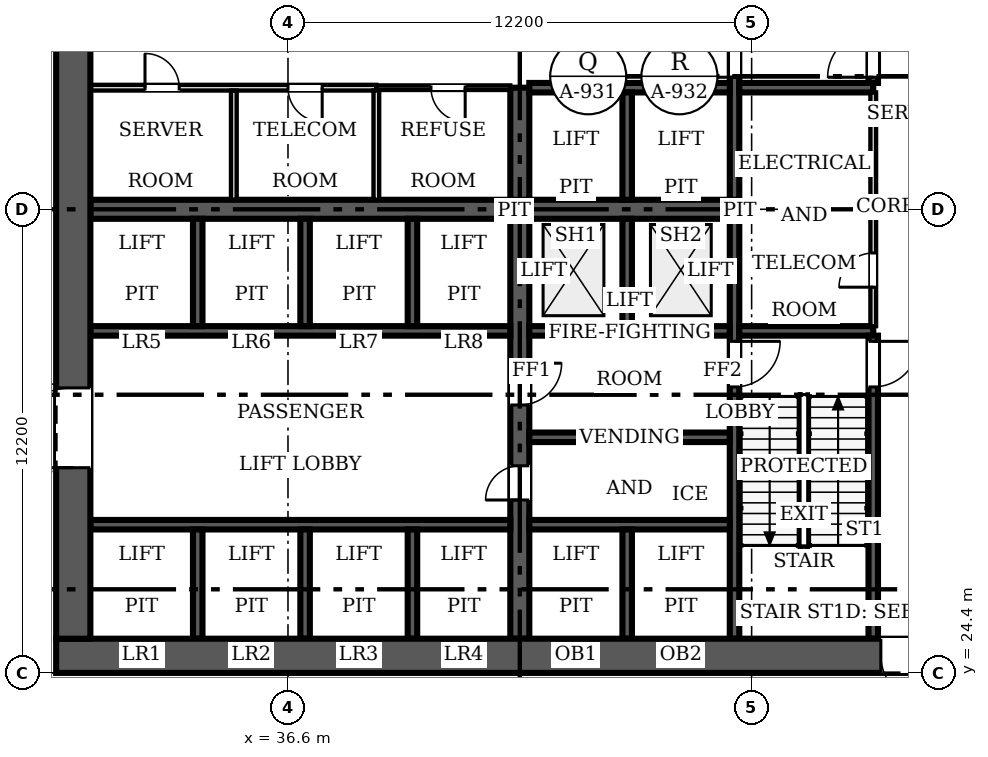
"""IFC4 building model, lengths in metres.
Left out: names, types, materials, properties, quantities, classifications, styles, units other than length and angle.
Written with IfcOpenShell. Run it as: python <this file> out.ifc"""

import sys

from ifc_helpers import new_model, si_unit, direction, frame, frame_2d, origin, place, context, subcontext, project, spatial, rectangle, extrude, source, transform, mapped, element, fill, save


model = new_model("IFC4")
c1 = context("Model", 3, precision=1e-05, world=origin(), true_north=direction((0.0, 1.0)))
c2 = subcontext(c1, "Body", "Model", "MODEL_VIEW")
j1 = project(units=[si_unit("LENGTHUNIT", "METRE"), si_unit("PLANEANGLEUNIT", "RADIAN")], contexts=[c1])
p1 = place(None, origin())
s1 = spatial("IfcSite", under=j1, at=p1, CompositionType="ELEMENT")
p2 = place(p1, origin())
s2 = spatial("IfcBuilding", under=s1, at=p2, CompositionType="ELEMENT")
p3 = place(p2, frame((0.0, 0.0, -5.4)))
s3 = spatial("IfcBuildingStorey", under=s2, at=p3, CompositionType="ELEMENT", Elevation=-5.4)
p4 = place(p3, frame((54.9, 24.85, 0.0), z_axis=(0.0, 0.0, 1.0), x_axis=(-1.0, 0.0, 0.0)))
e1 = element("IfcWall", 1, at=p4, inside=s3, PredefinedType="SHEAR", context=c2, shape_type="SweptSolid", body=[
    extrude(rectangle(XDim=24.4, YDim=0.9, at=frame_2d((12.2, 0.0))), origin(), (0.0, 0.0, 1.0), 5.4),
])
m1 = source(origin(), c2, "Body", "SweptSolid", [
    extrude(rectangle(XDim=1.2, YDim=2.1, at=frame_2d((0.6, 1.05))), frame((0.0, 0.46, 0.0), z_axis=(0.0, -1.0, 0.0), x_axis=(1.0, 0.0, 0.0)), (0.0, 0.0, 1.0), 0.92),
])
p5 = place(p4, frame((1.5, 0.0, 0.0)))
e2 = element("IfcOpeningElement", 2, at=p5, cuts=e1, PredefinedType="OPENING", context=c2, shape_type="MappedRepresentation", body=[
    mapped(m1, transform((0.0, 0.0, 0.0), scale=1.0)),
])
p6 = place(p3, frame((30.95, 25.3, 0.0), z_axis=(0.0, 0.0, 1.0), x_axis=(0.0, 1.0, 0.0)))
e3 = element("IfcWall", 3, at=p6, inside=s3, PredefinedType="SHEAR", context=c2, shape_type="SweptSolid", body=[
    extrude(rectangle(XDim=22.6, YDim=0.9, at=frame_2d((11.3, 0.0))), origin(), (0.0, 0.0, 1.0), 5.4),
])
m2 = source(origin(), c2, "Body", "SweptSolid", [
    extrude(rectangle(XDim=2.1, YDim=2.4, at=frame_2d((1.05, 1.2))), frame((0.0, 0.46, 0.0), z_axis=(0.0, -1.0, 0.0), x_axis=(1.0, 0.0, 0.0)), (0.0, 0.0, 1.0), 0.92),
])
p7 = place(p6, frame((4.5, 0.0, 0.0)))
e4 = element("IfcOpeningElement", 4, at=p7, cuts=e3, PredefinedType="OPENING", context=c2, shape_type="MappedRepresentation", body=[
    mapped(m2, transform((0.0, 0.0, 0.0), scale=1.0)),
])
p8 = place(p6, frame((16.0, 0.0, 0.0)))
e5 = element("IfcOpeningElement", 5, at=p8, cuts=e3, PredefinedType="OPENING", context=c2, shape_type="MappedRepresentation", body=[
    mapped(m2, transform((0.0, 0.0, 0.0), scale=1.0)),
])
p9 = place(p3, frame((31.4, 36.6, 0.0), z_axis=(0.0, 0.0, 1.0), x_axis=(1.0, 0.0, 0.0)))
e6 = element("IfcWall", 6, at=p9, inside=s3, PredefinedType="SHEAR", context=c2, shape_type="SweptSolid", body=[
    extrude(rectangle(XDim=16.95, YDim=0.5, at=frame_2d((8.475, 0.0))), origin(), (0.0, 0.0, 1.0), 5.4),
])
p10 = place(p3, frame((42.7, 36.35, 0.0), z_axis=(0.0, 0.0, 1.0), x_axis=(0.0, -1.0, 0.0)))
e7 = element("IfcWall", 7, at=p10, inside=s3, PredefinedType="SHEAR", context=c2, shape_type="SweptSolid", body=[
    extrude(rectangle(XDim=11.05, YDim=0.5, at=frame_2d((5.525, 0.0))), origin(), (0.0, 0.0, 1.0), 5.4),
])
m3 = source(origin(), c2, "Body", "SweptSolid", [
    extrude(rectangle(XDim=0.9, YDim=2.1, at=frame_2d((0.45, 1.05))), frame((0.0, 0.26, 0.0), z_axis=(0.0, -1.0, 0.0), x_axis=(1.0, 0.0, 0.0)), (0.0, 0.0, 1.0), 0.52),
])
p11 = place(p10, frame((6.5, 0.0, 0.0)))
e8 = element("IfcOpeningElement", 8, at=p11, cuts=e7, PredefinedType="OPENING", context=c2, shape_type="MappedRepresentation", body=[
    mapped(m3, transform((0.0, 0.0, 0.0), scale=1.0)),
])
m4 = source(origin(), c2, "Body", "SweptSolid", [
    extrude(rectangle(XDim=1.1, YDim=2.1, at=frame_2d((0.55, 1.05))), frame((0.0, 0.26, 0.0), z_axis=(0.0, -1.0, 0.0), x_axis=(1.0, 0.0, 0.0)), (0.0, 0.0, 1.0), 0.52),
])
p12 = place(p10, frame((3.8, 0.0, 0.0)))
e9 = element("IfcOpeningElement", 9, at=p12, cuts=e7, PredefinedType="OPENING", context=c2, shape_type="MappedRepresentation", body=[
    mapped(m4, transform((0.0, 0.0, 0.0), scale=1.0)),
])
p13 = place(p3, frame((42.7, 36.85, 0.0), z_axis=(0.0, 0.0, 1.0), x_axis=(0.0, 1.0, 0.0)))
e10 = element("IfcWall", 10, at=p13, inside=s3, PredefinedType="SHEAR", context=c2, shape_type="SweptSolid", body=[
    extrude(rectangle(XDim=2.95, YDim=0.5, at=frame_2d((1.475, 0.0))), origin(), (0.0, 0.0, 1.0), 5.4),
])
p14 = place(p3, frame((48.35, 36.35, 0.0), z_axis=(0.0, 0.0, 1.0), x_axis=(0.0, -1.0, 0.0)))
e11 = element("IfcWall", 11, at=p14, inside=s3, PredefinedType="SOLIDWALL", context=c2, shape_type="SweptSolid", body=[
    extrude(rectangle(XDim=11.05, YDim=0.25, at=frame_2d((5.525, 0.0))), origin(), (0.0, 0.0, 1.0), 5.4),
])
m5 = source(origin(), c2, "Body", "SweptSolid", [
    extrude(rectangle(XDim=1.2, YDim=2.1, at=frame_2d((0.6, 1.05))), frame((0.0, 0.135, 0.0), z_axis=(0.0, -1.0, 0.0), x_axis=(1.0, 0.0, 0.0)), (0.0, 0.0, 1.0), 0.27),
])
p15 = place(p14, frame((3.225, 0.0, 0.0)))
e12 = element("IfcOpeningElement", 12, at=p15, cuts=e11, PredefinedType="OPENING", context=c2, shape_type="MappedRepresentation", body=[
    mapped(m5, transform((0.0, 0.0, 0.0), scale=1.0)),
])
p16 = place(p3, frame((48.35, 47.9, 0.0), z_axis=(0.0, 0.0, 1.0), x_axis=(0.0, -1.0, 0.0)))
e13 = element("IfcWall", 13, at=p16, inside=s3, PredefinedType="SOLIDWALL", context=c2, shape_type="SweptSolid", body=[
    extrude(rectangle(XDim=11.05, YDim=0.25, at=frame_2d((5.525, 0.0))), origin(), (0.0, 0.0, 1.0), 5.4),
])
p17 = place(p16, frame((6.625, 0.0, 0.0)))
e14 = element("IfcOpeningElement", 14, at=p17, cuts=e13, PredefinedType="OPENING", context=c2, shape_type="MappedRepresentation", body=[
    mapped(m5, transform((0.0, 0.0, 0.0), scale=1.0)),
])
p18 = place(p3, frame((31.4, 33.4, 0.0), z_axis=(0.0, 0.0, 1.0), x_axis=(1.0, 0.0, 0.0)))
e15 = element("IfcWall", 15, at=p18, inside=s3, PredefinedType="SOLIDWALL", context=c2, shape_type="SweptSolid", body=[
    extrude(rectangle(XDim=11.05, YDim=0.25, at=frame_2d((5.525, 0.0))), origin(), (0.0, 0.0, 1.0), 5.4),
])
p19 = place(p3, frame((48.225, 33.4, 0.0), z_axis=(0.0, 0.0, 1.0), x_axis=(-1.0, 0.0, 0.0)))
e16 = element("IfcWall", 16, at=p19, inside=s3, PredefinedType="SOLIDWALL", context=c2, shape_type="SweptSolid", body=[
    extrude(rectangle(XDim=5.275, YDim=0.25, at=frame_2d((2.638, 0.0))), origin(), (0.0, 0.0, 1.0), 5.4),
])
p20 = place(p19, frame((3.512, 0.0, 0.0)))
e17 = element("IfcOpeningElement", 17, at=p20, cuts=e16, PredefinedType="OPENING", context=c2, shape_type="MappedRepresentation", body=[
    mapped(m5, transform((0.0, 0.0, 0.0), scale=1.0)),
])
p21 = place(p19, frame((0.688, 0.0, 0.0)))
e18 = element("IfcOpeningElement", 18, at=p21, cuts=e16, PredefinedType="OPENING", context=c2, shape_type="MappedRepresentation", body=[
    mapped(m5, transform((0.0, 0.0, 0.0), scale=1.0)),
])
p22 = place(p3, frame((48.475, 33.4, 0.0), z_axis=(0.0, 0.0, 1.0), x_axis=(1.0, 0.0, 0.0)))
e19 = element("IfcWall", 19, at=p22, inside=s3, PredefinedType="SOLIDWALL", context=c2, shape_type="SweptSolid", body=[
    extrude(rectangle(XDim=3.525, YDim=0.25, at=frame_2d((1.762, 0.0))), origin(), (0.0, 0.0, 1.0), 5.4),
])
p23 = place(p3, frame((31.4, 28.3, 0.0), z_axis=(0.0, 0.0, 1.0), x_axis=(1.0, 0.0, 0.0)))
e20 = element("IfcWall", 20, at=p23, inside=s3, PredefinedType="SOLIDWALL", context=c2, shape_type="SweptSolid", body=[
    extrude(rectangle(XDim=11.05, YDim=0.25, at=frame_2d((5.525, 0.0))), origin(), (0.0, 0.0, 1.0), 5.4),
])
for number, where, z_axis, x_axis in (
    (21, (42.95, 28.3, 0.0), (0.0, 0.0, 1.0), (1.0, 0.0, 0.0)),
    (22, (42.95, 39.8, 0.0), (0.0, 0.0, 1.0), (1.0, 0.0, 0.0)),
):
    element("IfcWall", number, at=place(p3, frame(where, z_axis=z_axis, x_axis=x_axis)), inside=s3, PredefinedType="SOLIDWALL", context=c2, shape_type="SweptSolid", body=[
        extrude(rectangle(XDim=5.275, YDim=0.25, at=frame_2d((2.638, 0.0))), origin(), (0.0, 0.0, 1.0), 5.4),
    ])
p24 = place(p3, frame((48.475, 39.8, 0.0), z_axis=(0.0, 0.0, 1.0), x_axis=(1.0, 0.0, 0.0)))
e23 = element("IfcWall", 23, at=p24, inside=s3, PredefinedType="SOLIDWALL", context=c2, shape_type="SweptSolid", body=[
    extrude(rectangle(XDim=3.525, YDim=0.25, at=frame_2d((1.762, 0.0))), origin(), (0.0, 0.0, 1.0), 5.4),
])
p25 = place(p3, frame((52.0, 25.3, 0.0), z_axis=(0.0, 0.0, 1.0), x_axis=(0.0, 1.0, 0.0)))
e24 = element("IfcWall", 24, at=p25, inside=s3, PredefinedType="SOLIDWALL", context=c2, shape_type="SweptSolid", body=[
    extrude(rectangle(XDim=7.975, YDim=0.25, at=frame_2d((3.987, 0.0))), origin(), (0.0, 0.0, 1.0), 5.4),
])
p26 = place(p25, frame((6.625, 0.0, 0.0)))
e25 = element("IfcOpeningElement", 25, at=p26, cuts=e24, PredefinedType="OPENING", context=c2, shape_type="MappedRepresentation", body=[
    mapped(m5, transform((0.0, 0.0, 0.0), scale=1.0)),
])
p27 = place(p3, frame((52.0, 39.925, 0.0), z_axis=(0.0, 0.0, 1.0), x_axis=(0.0, 1.0, 0.0)))
e26 = element("IfcWall", 26, at=p27, inside=s3, PredefinedType="SOLIDWALL", context=c2, shape_type="SweptSolid", body=[
    extrude(rectangle(XDim=7.975, YDim=0.25, at=frame_2d((3.987, 0.0))), origin(), (0.0, 0.0, 1.0), 5.4),
])
p28 = place(p27, frame((0.15, 0.0, 0.0)))
e27 = element("IfcOpeningElement", 27, at=p28, cuts=e26, PredefinedType="OPENING", context=c2, shape_type="MappedRepresentation", body=[
    mapped(m5, transform((0.0, 0.0, 0.0), scale=1.0)),
])
p29 = place(p3, frame((45.525, 33.525, 0.0), z_axis=(0.0, 0.0, 1.0), x_axis=(0.0, 1.0, 0.0)))
e28 = element("IfcWall", 28, at=p29, inside=s3, PredefinedType="SOLIDWALL", context=c2, shape_type="SweptSolid", body=[
    extrude(rectangle(XDim=2.825, YDim=0.25, at=frame_2d((1.413, 0.0))), origin(), (0.0, 0.0, 1.0), 5.4),
])
p30 = place(p3, frame((45.525, 36.85, 0.0), z_axis=(0.0, 0.0, 1.0), x_axis=(0.0, 1.0, 0.0)))
e29 = element("IfcWall", 29, at=p30, inside=s3, PredefinedType="SOLIDWALL", context=c2, shape_type="SweptSolid", body=[
    extrude(rectangle(XDim=2.825, YDim=0.25, at=frame_2d((1.413, 0.0))), origin(), (0.0, 0.0, 1.0), 5.4),
])
p31 = place(p3, frame((42.95, 30.6, 0.0), z_axis=(0.0, 0.0, 1.0), x_axis=(1.0, 0.0, 0.0)))
e30 = element("IfcWall", 30, at=p31, inside=s3, PredefinedType="SOLIDWALL", context=c2, shape_type="SweptSolid", body=[
    extrude(rectangle(XDim=5.275, YDim=0.25, at=frame_2d((2.638, 0.0))), origin(), (0.0, 0.0, 1.0), 5.4),
])
for number, where, z_axis, x_axis in (
    (31, (34.225, 33.525, 0.0), (0.0, 0.0, 1.0), (0.0, 1.0, 0.0)),
    (32, (37.05, 33.525, 0.0), (0.0, 0.0, 1.0), (0.0, 1.0, 0.0)),
    (33, (39.875, 33.525, 0.0), (0.0, 0.0, 1.0), (0.0, 1.0, 0.0)),
):
    element("IfcWall", number, at=place(p3, frame(where, z_axis=z_axis, x_axis=x_axis)), inside=s3, PredefinedType="SOLIDWALL", context=c2, shape_type="SweptSolid", body=[
        extrude(rectangle(XDim=2.825, YDim=0.25, at=frame_2d((1.413, 0.0))), origin(), (0.0, 0.0, 1.0), 5.4),
    ])
for number, where, z_axis, x_axis in (
    (34, (34.225, 25.3, 0.0), (0.0, 0.0, 1.0), (0.0, 1.0, 0.0)),
    (35, (37.05, 25.3, 0.0), (0.0, 0.0, 1.0), (0.0, 1.0, 0.0)),
    (36, (39.875, 25.3, 0.0), (0.0, 0.0, 1.0), (0.0, 1.0, 0.0)),
    (37, (45.525, 25.3, 0.0), (0.0, 0.0, 1.0), (0.0, 1.0, 0.0)),
):
    element("IfcWall", number, at=place(p3, frame(where, z_axis=z_axis, x_axis=x_axis)), inside=s3, PredefinedType="SOLIDWALL", context=c2, shape_type="SweptSolid", body=[
        extrude(rectangle(XDim=2.875, YDim=0.25, at=frame_2d((1.438, 0.0))), origin(), (0.0, 0.0, 1.0), 5.4),
    ])
p32 = place(p3, frame((38.925, 39.8, 0.0), z_axis=(0.0, 0.0, 1.0), x_axis=(-1.0, 0.0, 0.0)))
e38 = element("IfcWall", 38, at=p32, inside=s3, PredefinedType="PARTITIONING", context=c2, shape_type="SweptSolid", body=[
    extrude(rectangle(XDim=7.525, YDim=0.15, at=frame_2d((3.763, 0.0))), origin(), (0.0, 0.0, 1.0), 5.15),
])
m6 = source(origin(), c2, "Body", "SweptSolid", [
    extrude(rectangle(XDim=0.9, YDim=2.1, at=frame_2d((0.45, 1.05))), frame((0.0, 0.085, 0.0), z_axis=(0.0, -1.0, 0.0), x_axis=(1.0, 0.0, 0.0)), (0.0, 0.0, 1.0), 0.17),
])
p33 = place(p32, frame((5.188, 0.0, 0.0)))
e39 = element("IfcOpeningElement", 39, at=p33, cuts=e38, PredefinedType="OPENING", context=c2, shape_type="MappedRepresentation", body=[
    mapped(m6, transform((0.0, 0.0, 0.0), scale=1.0)),
])
p34 = place(p32, frame((1.425, 0.0, 0.0)))
e40 = element("IfcOpeningElement", 40, at=p34, cuts=e38, PredefinedType="OPENING", context=c2, shape_type="MappedRepresentation", body=[
    mapped(m6, transform((0.0, 0.0, 0.0), scale=1.0)),
])
p35 = place(p3, frame((52.0, 33.525, 0.0), z_axis=(0.0, 0.0, 1.0), x_axis=(0.0, 1.0, 0.0)))
e41 = element("IfcWall", 41, at=p35, inside=s3, PredefinedType="PARTITIONING", context=c2, shape_type="SweptSolid", body=[
    extrude(rectangle(XDim=6.15, YDim=0.15, at=frame_2d((3.075, 0.0))), origin(), (0.0, 0.0, 1.0), 5.15),
])
p36 = place(p35, frame((1.025, 0.0, 0.0)))
e42 = element("IfcOpeningElement", 42, at=p36, cuts=e41, PredefinedType="OPENING", context=c2, shape_type="MappedRepresentation", body=[
    mapped(m6, transform((0.0, 0.0, 0.0), scale=1.0)),
])
p37 = place(p3, frame((42.45, 39.8, 0.0), z_axis=(0.0, 0.0, 1.0), x_axis=(-1.0, 0.0, 0.0)))
e43 = element("IfcWall", 43, at=p37, inside=s3, PredefinedType="PARTITIONING", context=c2, shape_type="SweptSolid", body=[
    extrude(rectangle(XDim=3.525, YDim=0.12, at=frame_2d((1.762, 0.0))), origin(), (0.0, 0.0, 1.0), 5.15),
])
m7 = source(origin(), c2, "Body", "SweptSolid", [
    extrude(rectangle(XDim=0.9, YDim=2.1, at=frame_2d((0.45, 1.05))), frame((0.0, 0.07, 0.0), z_axis=(0.0, -1.0, 0.0), x_axis=(1.0, 0.0, 0.0)), (0.0, 0.0, 1.0), 0.14),
])
p38 = place(p37, frame((1.188, 0.0, 0.0)))
e44 = element("IfcOpeningElement", 44, at=p38, cuts=e43, PredefinedType="OPENING", context=c2, shape_type="MappedRepresentation", body=[
    mapped(m7, transform((0.0, 0.0, 0.0), scale=1.0)),
])
for number, where, z_axis, x_axis in (
    (45, (35.175, 36.85, 0.0), (0.0, 0.0, 1.0), (0.0, 1.0, 0.0)),
    (46, (38.925, 36.85, 0.0), (0.0, 0.0, 1.0), (0.0, 1.0, 0.0)),
):
    element("IfcWall", number, at=place(p3, frame(where, z_axis=z_axis, x_axis=x_axis)), inside=s3, PredefinedType="PARTITIONING", context=c2, shape_type="SweptSolid", body=[
        extrude(rectangle(XDim=2.875, YDim=0.15, at=frame_2d((1.438, 0.0))), origin(), (0.0, 0.0, 1.0), 5.15),
    ])
m8 = source(origin(), c2, "Body", "SweptSolid", [
    extrude(rectangle(XDim=1.2, YDim=2.1, at=frame_2d((0.6, 1.05))), frame((0.0, 0.025, 0.0), z_axis=(0.0, -1.0, 0.0), x_axis=(1.0, 0.0, 0.0)), (0.0, 0.0, 1.0), 0.05),
])
p39 = place(p5, origin())
e47 = element("IfcDoor", 47, at=p39, inside=s3, OperationType="SINGLE_SWING_LEFT", PredefinedType="DOOR", context=c2, shape_type="MappedRepresentation", body=[
    mapped(m8, transform((0.0, 0.0, 0.0), scale=1.0)),
])
fill(e2, e47)
m9 = source(origin(), c2, "Body", "SweptSolid", [
    extrude(rectangle(XDim=2.1, YDim=2.4, at=frame_2d((1.05, 1.2))), frame((0.0, 0.025, 0.0), z_axis=(0.0, -1.0, 0.0), x_axis=(1.0, 0.0, 0.0)), (0.0, 0.0, 1.0), 0.05),
])
p40 = place(p7, origin())
e48 = element("IfcDoor", 48, at=p40, inside=s3, OperationType="DOUBLE_DOOR_SINGLE_SWING", PredefinedType="DOOR", context=c2, shape_type="MappedRepresentation", body=[
    mapped(m9, transform((0.0, 0.0, 0.0), scale=1.0)),
])
fill(e4, e48)
m10 = source(origin(), c2, "Body", "SweptSolid", [
    extrude(rectangle(XDim=0.9, YDim=2.1, at=frame_2d((0.45, 1.05))), frame((0.0, 0.025, 0.0), z_axis=(0.0, -1.0, 0.0), x_axis=(1.0, 0.0, 0.0)), (0.0, 0.0, 1.0), 0.05),
])
p41 = place(p11, origin())
e49 = element("IfcDoor", 49, at=p41, inside=s3, OperationType="SINGLE_SWING_RIGHT", PredefinedType="DOOR", context=c2, shape_type="MappedRepresentation", body=[
    mapped(m10, transform((0.0, 0.0, 0.0), scale=1.0)),
])
fill(e8, e49)
m11 = source(origin(), c2, "Body", "SweptSolid", [
    extrude(rectangle(XDim=1.1, YDim=2.1, at=frame_2d((0.55, 1.05))), frame((0.0, 0.025, 0.0), z_axis=(0.0, -1.0, 0.0), x_axis=(1.0, 0.0, 0.0)), (0.0, 0.0, 1.0), 0.05),
])
p42 = place(p12, origin())
e50 = element("IfcDoor", 50, at=p42, inside=s3, OperationType="SINGLE_SWING_LEFT", PredefinedType="DOOR", context=c2, shape_type="MappedRepresentation", body=[
    mapped(m11, transform((0.0, 0.0, 0.0), scale=1.0)),
])
fill(e9, e50)
p43 = place(p15, origin())
e51 = element("IfcDoor", 51, at=p43, inside=s3, OperationType="SINGLE_SWING_LEFT", PredefinedType="DOOR", context=c2, shape_type="MappedRepresentation", body=[
    mapped(m8, transform((0.0, 0.0, 0.0), scale=1.0)),
])
fill(e12, e51)
p44 = place(p17, origin())
e52 = element("IfcDoor", 52, at=p44, inside=s3, OperationType="SINGLE_SWING_RIGHT", PredefinedType="DOOR", context=c2, shape_type="MappedRepresentation", body=[
    mapped(m8, transform((0.0, 0.0, 0.0), scale=1.0)),
])
fill(e14, e52)
p45 = place(p20, origin())
e53 = element("IfcDoor", 53, at=p45, inside=s3, OperationType="DOUBLE_DOOR_SLIDING", PredefinedType="DOOR", context=c2, shape_type="MappedRepresentation", body=[
    mapped(m8, transform((0.0, 0.0, 0.0), scale=1.0)),
])
fill(e17, e53)
p46 = place(p21, origin())
e54 = element("IfcDoor", 54, at=p46, inside=s3, OperationType="DOUBLE_DOOR_SLIDING", PredefinedType="DOOR", context=c2, shape_type="MappedRepresentation", body=[
    mapped(m8, transform((0.0, 0.0, 0.0), scale=1.0)),
])
fill(e18, e54)
p47 = place(p26, origin())
e55 = element("IfcDoor", 55, at=p47, inside=s3, OperationType="SINGLE_SWING_RIGHT", PredefinedType="DOOR", context=c2, shape_type="MappedRepresentation", body=[
    mapped(m8, transform((0.0, 0.0, 0.0), scale=1.0)),
])
fill(e25, e55)
p48 = place(p28, origin())
e56 = element("IfcDoor", 56, at=p48, inside=s3, OperationType="SINGLE_SWING_LEFT", PredefinedType="DOOR", context=c2, shape_type="MappedRepresentation", body=[
    mapped(m8, transform((0.0, 0.0, 0.0), scale=1.0)),
])
fill(e27, e56)
p49 = place(p33, origin())
e57 = element("IfcDoor", 57, at=p49, inside=s3, OperationType="SINGLE_SWING_RIGHT", PredefinedType="DOOR", context=c2, shape_type="MappedRepresentation", body=[
    mapped(m10, transform((0.0, 0.0, 0.0), scale=1.0)),
])
fill(e39, e57)
p50 = place(p34, origin())
e58 = element("IfcDoor", 58, at=p50, inside=s3, OperationType="SINGLE_SWING_LEFT", PredefinedType="DOOR", context=c2, shape_type="MappedRepresentation", body=[
    mapped(m10, transform((0.0, 0.0, 0.0), scale=1.0)),
])
fill(e40, e58)
p51 = place(p36, origin())
e59 = element("IfcDoor", 59, at=p51, inside=s3, OperationType="SINGLE_SWING_LEFT", PredefinedType="DOOR", context=c2, shape_type="MappedRepresentation", body=[
    mapped(m10, transform((0.0, 0.0, 0.0), scale=1.0)),
])
fill(e42, e59)
p52 = place(p38, origin())
e60 = element("IfcDoor", 60, at=p52, inside=s3, OperationType="SINGLE_SWING_LEFT", PredefinedType="DOOR", context=c2, shape_type="MappedRepresentation", body=[
    mapped(m10, transform((0.0, 0.0, 0.0), scale=1.0)),
])
fill(e44, e60)
save(model, sys.argv[1])
